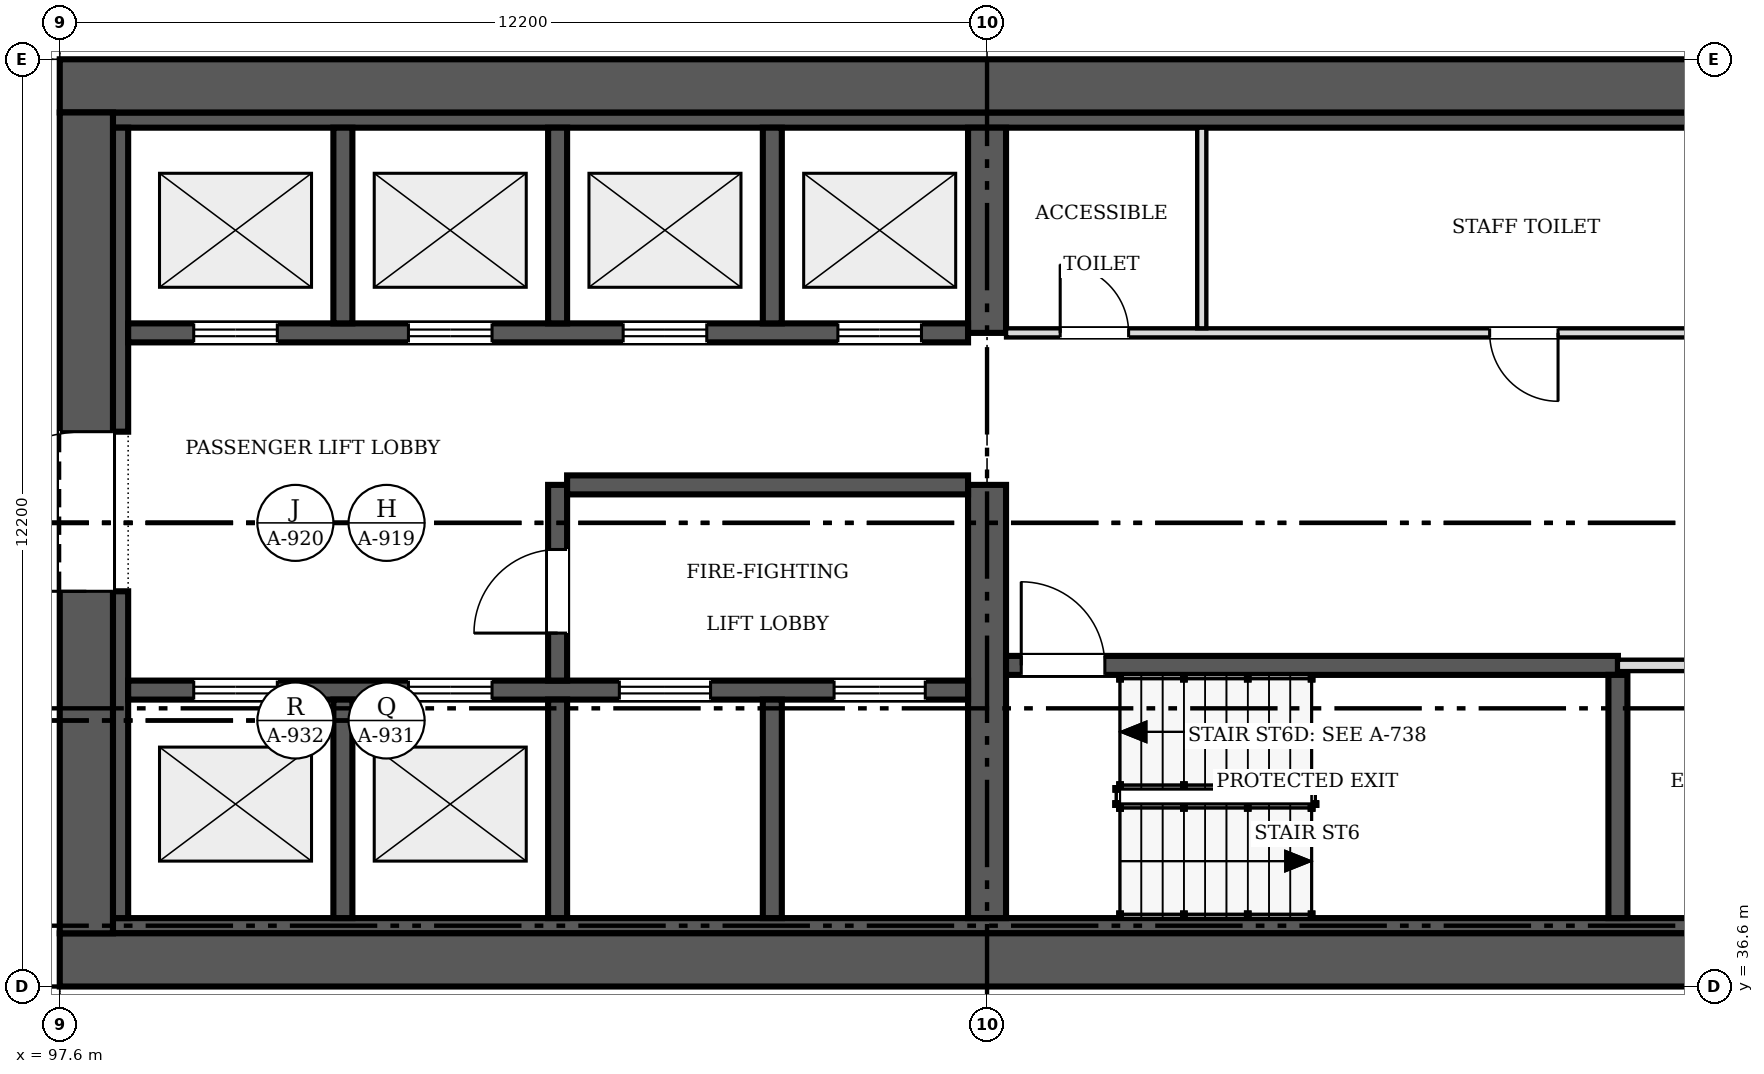
"""IFC4 building model, lengths in metres.
Left out: names, types, materials, properties, quantities, classifications, styles, units other than length and angle.
Written with IfcOpenShell. Run it as: python <this file> out.ifc"""

import sys

from ifc_helpers import new_model, si_unit, direction, frame, frame_2d, origin, place, context, subcontext, project, spatial, rectangle, extrude, source, transform, mapped, element, fill, save


model = new_model("IFC4")
c1 = context("Model", 3, precision=1e-05, world=origin(), true_north=direction((0.0, 1.0)))
c2 = subcontext(c1, "Body", "Model", "MODEL_VIEW")
j1 = project(units=[si_unit("LENGTHUNIT", "METRE"), si_unit("PLANEANGLEUNIT", "RADIAN")], contexts=[c1])
p1 = place(None, origin())
s1 = spatial("IfcSite", under=j1, at=p1, CompositionType="ELEMENT")
p2 = place(p1, origin())
s2 = spatial("IfcBuilding", under=s1, at=p2, CompositionType="ELEMENT")
p3 = place(p2, origin())
s3 = spatial("IfcBuildingStorey", under=s2, at=p3, CompositionType="ELEMENT", Elevation=0.0)
p4 = place(p3, frame((122.0, 36.95, 0.0), z_axis=(0.0, 0.0, 1.0), x_axis=(-1.0, 0.0, 0.0)))
e1 = element("IfcWall", 1, at=p4, inside=s3, PredefinedType="SHEAR", context=c2, shape_type="SweptSolid", body=[
    extrude(rectangle(XDim=24.4, YDim=0.7, at=frame_2d((12.2, 0.0))), origin(), (0.0, 0.0, 1.0), 7.2),
])
p5 = place(p3, frame((97.95, 37.3, 0.0), z_axis=(0.0, 0.0, 1.0), x_axis=(0.0, 1.0, 0.0)))
e2 = element("IfcWall", 2, at=p5, inside=s3, PredefinedType="SHEAR", context=c2, shape_type="SweptSolid", body=[
    extrude(rectangle(XDim=10.8, YDim=0.7, at=frame_2d((5.4, 0.0))), origin(), (0.0, 0.0, 1.0), 7.2),
])
m1 = source(origin(), c2, "Body", "SweptSolid", [
    extrude(rectangle(XDim=2.1, YDim=2.4, at=frame_2d((1.05, 1.2))), frame((0.0, 0.36, 0.0), z_axis=(0.0, -1.0, 0.0), x_axis=(1.0, 0.0, 0.0)), (0.0, 0.0, 1.0), 0.72),
])
p6 = place(p5, frame((4.5, 0.0, 0.0)))
e3 = element("IfcOpeningElement", 3, at=p6, cuts=e2, PredefinedType="OPENING", context=c2, shape_type="MappedRepresentation", body=[
    mapped(m1, transform((0.0, 0.0, 0.0), scale=1.0)),
])
p7 = place(p3, frame((97.6, 48.45, 0.0), z_axis=(0.0, 0.0, 1.0), x_axis=(1.0, 0.0, 0.0)))
e4 = element("IfcWall", 4, at=p7, inside=s3, PredefinedType="SHEAR", context=c2, shape_type="SweptSolid", body=[
    extrude(rectangle(XDim=24.4, YDim=0.7, at=frame_2d((12.2, 0.0))), origin(), (0.0, 0.0, 1.0), 7.2),
])
for number, where, z_axis, x_axis in (
    (5, (98.3, 37.4, 0.0), (0.0, 0.0, 1.0), (1.0, 0.0, 0.0)),
    (6, (98.3, 48.0, 0.0), (0.0, 0.0, 1.0), (1.0, 0.0, 0.0)),
):
    element("IfcWall", number, at=place(p3, frame(where, z_axis=z_axis, x_axis=x_axis)), inside=s3, PredefinedType="SOLIDWALL", context=c2, shape_type="SweptSolid", body=[
        extrude(rectangle(XDim=23.0, YDim=0.2, at=frame_2d((11.5, 0.0))), origin(), (0.0, 0.0, 1.0), 7.2),
    ])
p8 = place(p3, frame((98.4, 37.5, 0.0), z_axis=(0.0, 0.0, 1.0), x_axis=(0.0, 1.0, 0.0)))
e7 = element("IfcWall", 7, at=p8, inside=s3, PredefinedType="SOLIDWALL", context=c2, shape_type="SweptSolid", body=[
    extrude(rectangle(XDim=4.3, YDim=0.2, at=frame_2d((2.15, 0.0))), origin(), (0.0, 0.0, 1.0), 7.2),
])
p9 = place(p3, frame((98.4, 43.9, 0.0), z_axis=(0.0, 0.0, 1.0), x_axis=(0.0, 1.0, 0.0)))
e8 = element("IfcWall", 8, at=p9, inside=s3, PredefinedType="SOLIDWALL", context=c2, shape_type="SweptSolid", body=[
    extrude(rectangle(XDim=4.0, YDim=0.2, at=frame_2d((2.0, 0.0))), origin(), (0.0, 0.0, 1.0), 7.2),
])
p10 = place(p3, frame((109.8, 37.5, 0.0), z_axis=(0.0, 0.0, 1.0), x_axis=(0.0, 1.0, 0.0)))
e9 = element("IfcWall", 9, at=p10, inside=s3, PredefinedType="SHEAR", context=c2, shape_type="SweptSolid", body=[
    extrude(rectangle(XDim=5.7, YDim=0.5, at=frame_2d((2.85, 0.0))), origin(), (0.0, 0.0, 1.0), 7.2),
])
p11 = place(p3, frame((109.8, 45.2, 0.0), z_axis=(0.0, 0.0, 1.0), x_axis=(0.0, 1.0, 0.0)))
e10 = element("IfcWall", 10, at=p11, inside=s3, PredefinedType="SHEAR", context=c2, shape_type="SweptSolid", body=[
    extrude(rectangle(XDim=2.7, YDim=0.5, at=frame_2d((1.35, 0.0))), origin(), (0.0, 0.0, 1.0), 7.2),
])
p12 = place(p3, frame((98.5, 40.5, 0.0), z_axis=(0.0, 0.0, 1.0), x_axis=(1.0, 0.0, 0.0)))
e11 = element("IfcWall", 11, at=p12, inside=s3, PredefinedType="SOLIDWALL", context=c2, shape_type="SweptSolid", body=[
    extrude(rectangle(XDim=11.05, YDim=0.25, at=frame_2d((5.525, 0.0))), origin(), (0.0, 0.0, 1.0), 7.2),
])
m2 = source(origin(), c2, "Body", "SweptSolid", [
    extrude(rectangle(XDim=1.1, YDim=2.1, at=frame_2d((0.55, 1.05))), frame((0.0, 0.135, 0.0), z_axis=(0.0, -1.0, 0.0), x_axis=(1.0, 0.0, 0.0)), (0.0, 0.0, 1.0), 0.27),
])
p13 = place(p12, frame((0.863, 0.0, 0.0)))
e12 = element("IfcOpeningElement", 12, at=p13, cuts=e11, PredefinedType="OPENING", context=c2, shape_type="MappedRepresentation", body=[
    mapped(m2, transform((0.0, 0.0, 0.0), scale=1.0)),
])
p14 = place(p12, frame((3.688, 0.0, 0.0)))
e13 = element("IfcOpeningElement", 13, at=p14, cuts=e11, PredefinedType="OPENING", context=c2, shape_type="MappedRepresentation", body=[
    mapped(m2, transform((0.0, 0.0, 0.0), scale=1.0)),
])
m3 = source(origin(), c2, "Body", "SweptSolid", [
    extrude(rectangle(XDim=1.2, YDim=2.1, at=frame_2d((0.6, 1.05))), frame((0.0, 0.135, 0.0), z_axis=(0.0, -1.0, 0.0), x_axis=(1.0, 0.0, 0.0)), (0.0, 0.0, 1.0), 0.27),
])
p15 = place(p12, frame((6.462, 0.0, 0.0)))
e14 = element("IfcOpeningElement", 14, at=p15, cuts=e11, PredefinedType="OPENING", context=c2, shape_type="MappedRepresentation", body=[
    mapped(m3, transform((0.0, 0.0, 0.0), scale=1.0)),
])
p16 = place(p12, frame((9.288, 0.0, 0.0)))
e15 = element("IfcOpeningElement", 15, at=p16, cuts=e11, PredefinedType="OPENING", context=c2, shape_type="MappedRepresentation", body=[
    mapped(m3, transform((0.0, 0.0, 0.0), scale=1.0)),
])
p17 = place(p3, frame((109.55, 45.2, 0.0), z_axis=(0.0, 0.0, 1.0), x_axis=(-1.0, 0.0, 0.0)))
e16 = element("IfcWall", 16, at=p17, inside=s3, PredefinedType="SOLIDWALL", context=c2, shape_type="SweptSolid", body=[
    extrude(rectangle(XDim=11.05, YDim=0.25, at=frame_2d((5.525, 0.0))), origin(), (0.0, 0.0, 1.0), 7.2),
])
p18 = place(p17, frame((9.087, 0.0, 0.0)))
e17 = element("IfcOpeningElement", 17, at=p18, cuts=e16, PredefinedType="OPENING", context=c2, shape_type="MappedRepresentation", body=[
    mapped(m2, transform((0.0, 0.0, 0.0), scale=1.0)),
])
p19 = place(p17, frame((6.262, 0.0, 0.0)))
e18 = element("IfcOpeningElement", 18, at=p19, cuts=e16, PredefinedType="OPENING", context=c2, shape_type="MappedRepresentation", body=[
    mapped(m2, transform((0.0, 0.0, 0.0), scale=1.0)),
])
p20 = place(p17, frame((3.438, 0.0, 0.0)))
e19 = element("IfcOpeningElement", 19, at=p20, cuts=e16, PredefinedType="OPENING", context=c2, shape_type="MappedRepresentation", body=[
    mapped(m2, transform((0.0, 0.0, 0.0), scale=1.0)),
])
p21 = place(p17, frame((0.613, 0.0, 0.0)))
e20 = element("IfcOpeningElement", 20, at=p21, cuts=e16, PredefinedType="OPENING", context=c2, shape_type="MappedRepresentation", body=[
    mapped(m2, transform((0.0, 0.0, 0.0), scale=1.0)),
])
p22 = place(p3, frame((118.1, 40.825, 0.0), z_axis=(0.0, 0.0, 1.0), x_axis=(-1.0, 0.0, 0.0)))
e21 = element("IfcWall", 21, at=p22, inside=s3, PredefinedType="SOLIDWALL", context=c2, shape_type="SweptSolid", body=[
    extrude(rectangle(XDim=8.05, YDim=0.25, at=frame_2d((4.025, 0.0))), origin(), (0.0, 0.0, 1.0), 7.2),
])
p23 = place(p22, frame((6.75, 0.0, 0.0)))
e22 = element("IfcOpeningElement", 22, at=p23, cuts=e21, PredefinedType="OPENING", context=c2, shape_type="MappedRepresentation", body=[
    mapped(m2, transform((0.0, 0.0, 0.0), scale=1.0)),
])
p24 = place(p3, frame((104.15, 37.5, 0.0), z_axis=(0.0, 0.0, 1.0), x_axis=(0.0, 1.0, 0.0)))
e23 = element("IfcWall", 23, at=p24, inside=s3, PredefinedType="SOLIDWALL", context=c2, shape_type="SweptSolid", body=[
    extrude(rectangle(XDim=2.875, YDim=0.25, at=frame_2d((1.438, 0.0))), origin(), (0.0, 0.0, 1.0), 7.2),
])
p25 = place(p3, frame((104.15, 43.2, 0.0), z_axis=(0.0, 0.0, 1.0), x_axis=(0.0, -1.0, 0.0)))
e24 = element("IfcWall", 24, at=p25, inside=s3, PredefinedType="SOLIDWALL", context=c2, shape_type="SweptSolid", body=[
    extrude(rectangle(XDim=2.575, YDim=0.25, at=frame_2d((1.288, 0.0))), origin(), (0.0, 0.0, 1.0), 7.2),
])
p26 = place(p25, frame((0.85, 0.0, 0.0)))
e25 = element("IfcOpeningElement", 25, at=p26, cuts=e24, PredefinedType="OPENING", context=c2, shape_type="MappedRepresentation", body=[
    mapped(m2, transform((0.0, 0.0, 0.0), scale=1.0)),
])
p27 = place(p3, frame((104.275, 43.2, 0.0), z_axis=(0.0, 0.0, 1.0), x_axis=(1.0, 0.0, 0.0)))
e26 = element("IfcWall", 26, at=p27, inside=s3, PredefinedType="SOLIDWALL", context=c2, shape_type="SweptSolid", body=[
    extrude(rectangle(XDim=5.275, YDim=0.25, at=frame_2d((2.638, 0.0))), origin(), (0.0, 0.0, 1.0), 7.2),
])
p28 = place(p3, frame((118.1, 37.5, 0.0), z_axis=(0.0, 0.0, 1.0), x_axis=(0.0, 1.0, 0.0)))
e27 = element("IfcWall", 27, at=p28, inside=s3, PredefinedType="SOLIDWALL", context=c2, shape_type="SweptSolid", body=[
    extrude(rectangle(XDim=3.2, YDim=0.25, at=frame_2d((1.6, 0.0))), origin(), (0.0, 0.0, 1.0), 7.2),
])
for number, where, z_axis, x_axis in (
    (28, (101.325, 37.5, 0.0), (0.0, 0.0, 1.0), (0.0, 1.0, 0.0)),
    (29, (106.975, 37.5, 0.0), (0.0, 0.0, 1.0), (0.0, 1.0, 0.0)),
):
    element("IfcWall", number, at=place(p3, frame(where, z_axis=z_axis, x_axis=x_axis)), inside=s3, PredefinedType="SOLIDWALL", context=c2, shape_type="SweptSolid", body=[
        extrude(rectangle(XDim=2.875, YDim=0.25, at=frame_2d((1.438, 0.0))), origin(), (0.0, 0.0, 1.0), 7.2),
    ])
for number, where, z_axis, x_axis in (
    (30, (101.325, 45.325, 0.0), (0.0, 0.0, 1.0), (0.0, 1.0, 0.0)),
    (31, (104.15, 45.325, 0.0), (0.0, 0.0, 1.0), (0.0, 1.0, 0.0)),
    (32, (106.975, 45.325, 0.0), (0.0, 0.0, 1.0), (0.0, 1.0, 0.0)),
):
    element("IfcWall", number, at=place(p3, frame(where, z_axis=z_axis, x_axis=x_axis)), inside=s3, PredefinedType="SOLIDWALL", context=c2, shape_type="SweptSolid", body=[
        extrude(rectangle(XDim=2.575, YDim=0.25, at=frame_2d((1.288, 0.0))), origin(), (0.0, 0.0, 1.0), 7.2),
    ])
p29 = place(p3, frame((110.05, 45.2, 0.0), z_axis=(0.0, 0.0, 1.0), x_axis=(1.0, 0.0, 0.0)))
e33 = element("IfcWall", 33, at=p29, inside=s3, PredefinedType="PARTITIONING", context=c2, shape_type="SweptSolid", body=[
    extrude(rectangle(XDim=11.05, YDim=0.12, at=frame_2d((5.525, 0.0))), origin(), (0.0, 0.0, 1.0), 6.95),
])
m4 = source(origin(), c2, "Body", "SweptSolid", [
    extrude(rectangle(XDim=0.9, YDim=2.1, at=frame_2d((0.45, 1.05))), frame((0.0, 0.07, 0.0), z_axis=(0.0, -1.0, 0.0), x_axis=(1.0, 0.0, 0.0)), (0.0, 0.0, 1.0), 0.14),
])
p30 = place(p29, frame((0.712, 0.0, 0.0)))
e34 = element("IfcOpeningElement", 34, at=p30, cuts=e33, PredefinedType="OPENING", context=c2, shape_type="MappedRepresentation", body=[
    mapped(m4, transform((0.0, 0.0, 0.0), scale=1.0)),
])
p31 = place(p29, frame((6.363, 0.0, 0.0)))
e35 = element("IfcOpeningElement", 35, at=p31, cuts=e33, PredefinedType="OPENING", context=c2, shape_type="MappedRepresentation", body=[
    mapped(m4, transform((0.0, 0.0, 0.0), scale=1.0)),
])
p32 = place(p3, frame((121.1, 40.825, 0.0), z_axis=(0.0, 0.0, 1.0), x_axis=(-1.0, 0.0, 0.0)))
e36 = element("IfcWall", 36, at=p32, inside=s3, PredefinedType="PARTITIONING", context=c2, shape_type="SweptSolid", body=[
    extrude(rectangle(XDim=3.0, YDim=0.15, at=frame_2d((1.5, 0.0))), origin(), (0.0, 0.0, 1.0), 6.95),
])
m5 = source(origin(), c2, "Body", "SweptSolid", [
    extrude(rectangle(XDim=0.9, YDim=2.1, at=frame_2d((0.45, 1.05))), frame((0.0, 0.085, 0.0), z_axis=(0.0, -1.0, 0.0), x_axis=(1.0, 0.0, 0.0)), (0.0, 0.0, 1.0), 0.17),
])
p33 = place(p32, frame((1.05, 0.0, 0.0)))
e37 = element("IfcOpeningElement", 37, at=p33, cuts=e36, PredefinedType="OPENING", context=c2, shape_type="MappedRepresentation", body=[
    mapped(m5, transform((0.0, 0.0, 0.0), scale=1.0)),
])
p34 = place(p3, frame((112.625, 45.26, 0.0), z_axis=(0.0, 0.0, 1.0), x_axis=(0.0, 1.0, 0.0)))
e38 = element("IfcWall", 38, at=p34, inside=s3, PredefinedType="PARTITIONING", context=c2, shape_type="SweptSolid", body=[
    extrude(rectangle(XDim=2.64, YDim=0.12, at=frame_2d((1.32, 0.0))), origin(), (0.0, 0.0, 1.0), 6.95),
])
m6 = source(origin(), c2, "Body", "SweptSolid", [
    extrude(rectangle(XDim=2.1, YDim=2.4, at=frame_2d((1.05, 1.2))), frame((0.0, 0.025, 0.0), z_axis=(0.0, -1.0, 0.0), x_axis=(1.0, 0.0, 0.0)), (0.0, 0.0, 1.0), 0.05),
])
p35 = place(p6, origin())
e39 = element("IfcDoor", 39, at=p35, inside=s3, OperationType="DOUBLE_DOOR_SINGLE_SWING", PredefinedType="DOOR", context=c2, shape_type="MappedRepresentation", body=[
    mapped(m6, transform((0.0, 0.0, 0.0), scale=1.0)),
])
fill(e3, e39)
m7 = source(origin(), c2, "Body", "SweptSolid", [
    extrude(rectangle(XDim=1.1, YDim=2.1, at=frame_2d((0.55, 1.05))), frame((0.0, 0.025, 0.0), z_axis=(0.0, -1.0, 0.0), x_axis=(1.0, 0.0, 0.0)), (0.0, 0.0, 1.0), 0.05),
])
p36 = place(p13, origin())
e40 = element("IfcDoor", 40, at=p36, inside=s3, OperationType="DOUBLE_DOOR_SLIDING", PredefinedType="DOOR", context=c2, shape_type="MappedRepresentation", body=[
    mapped(m7, transform((0.0, 0.0, 0.0), scale=1.0)),
])
fill(e12, e40)
p37 = place(p14, origin())
e41 = element("IfcDoor", 41, at=p37, inside=s3, OperationType="DOUBLE_DOOR_SLIDING", PredefinedType="DOOR", context=c2, shape_type="MappedRepresentation", body=[
    mapped(m7, transform((0.0, 0.0, 0.0), scale=1.0)),
])
fill(e13, e41)
m8 = source(origin(), c2, "Body", "SweptSolid", [
    extrude(rectangle(XDim=1.2, YDim=2.1, at=frame_2d((0.6, 1.05))), frame((0.0, 0.025, 0.0), z_axis=(0.0, -1.0, 0.0), x_axis=(1.0, 0.0, 0.0)), (0.0, 0.0, 1.0), 0.05),
])
p38 = place(p15, origin())
e42 = element("IfcDoor", 42, at=p38, inside=s3, OperationType="DOUBLE_DOOR_SLIDING", PredefinedType="DOOR", context=c2, shape_type="MappedRepresentation", body=[
    mapped(m8, transform((0.0, 0.0, 0.0), scale=1.0)),
])
fill(e14, e42)
p39 = place(p16, origin())
e43 = element("IfcDoor", 43, at=p39, inside=s3, OperationType="DOUBLE_DOOR_SLIDING", PredefinedType="DOOR", context=c2, shape_type="MappedRepresentation", body=[
    mapped(m8, transform((0.0, 0.0, 0.0), scale=1.0)),
])
fill(e15, e43)
p40 = place(p18, origin())
e44 = element("IfcDoor", 44, at=p40, inside=s3, OperationType="DOUBLE_DOOR_SLIDING", PredefinedType="DOOR", context=c2, shape_type="MappedRepresentation", body=[
    mapped(m7, transform((0.0, 0.0, 0.0), scale=1.0)),
])
fill(e17, e44)
p41 = place(p19, origin())
e45 = element("IfcDoor", 45, at=p41, inside=s3, OperationType="DOUBLE_DOOR_SLIDING", PredefinedType="DOOR", context=c2, shape_type="MappedRepresentation", body=[
    mapped(m7, transform((0.0, 0.0, 0.0), scale=1.0)),
])
fill(e18, e45)
p42 = place(p20, origin())
e46 = element("IfcDoor", 46, at=p42, inside=s3, OperationType="DOUBLE_DOOR_SLIDING", PredefinedType="DOOR", context=c2, shape_type="MappedRepresentation", body=[
    mapped(m7, transform((0.0, 0.0, 0.0), scale=1.0)),
])
fill(e19, e46)
p43 = place(p21, origin())
e47 = element("IfcDoor", 47, at=p43, inside=s3, OperationType="DOUBLE_DOOR_SLIDING", PredefinedType="DOOR", context=c2, shape_type="MappedRepresentation", body=[
    mapped(m7, transform((0.0, 0.0, 0.0), scale=1.0)),
])
fill(e20, e47)
p44 = place(p23, origin())
e48 = element("IfcDoor", 48, at=p44, inside=s3, OperationType="SINGLE_SWING_RIGHT", PredefinedType="DOOR", context=c2, shape_type="MappedRepresentation", body=[
    mapped(m7, transform((0.0, 0.0, 0.0), scale=1.0)),
])
fill(e22, e48)
p45 = place(p26, origin())
e49 = element("IfcDoor", 49, at=p45, inside=s3, OperationType="SINGLE_SWING_RIGHT", PredefinedType="DOOR", context=c2, shape_type="MappedRepresentation", body=[
    mapped(m7, transform((0.0, 0.0, 0.0), scale=1.0)),
])
fill(e25, e49)
m9 = source(origin(), c2, "Body", "SweptSolid", [
    extrude(rectangle(XDim=0.9, YDim=2.1, at=frame_2d((0.45, 1.05))), frame((0.0, 0.025, 0.0), z_axis=(0.0, -1.0, 0.0), x_axis=(1.0, 0.0, 0.0)), (0.0, 0.0, 1.0), 0.05),
])
p46 = place(p30, origin())
e50 = element("IfcDoor", 50, at=p46, inside=s3, OperationType="SINGLE_SWING_LEFT", PredefinedType="DOOR", context=c2, shape_type="MappedRepresentation", body=[
    mapped(m9, transform((0.0, 0.0, 0.0), scale=1.0)),
])
fill(e34, e50)
p47 = place(p31, origin())
e51 = element("IfcDoor", 51, at=p47, inside=s3, OperationType="SINGLE_SWING_RIGHT", PredefinedType="DOOR", context=c2, shape_type="MappedRepresentation", body=[
    mapped(m9, transform((0.0, 0.0, 0.0), scale=1.0)),
])
fill(e35, e51)
save(model, sys.argv[1])
